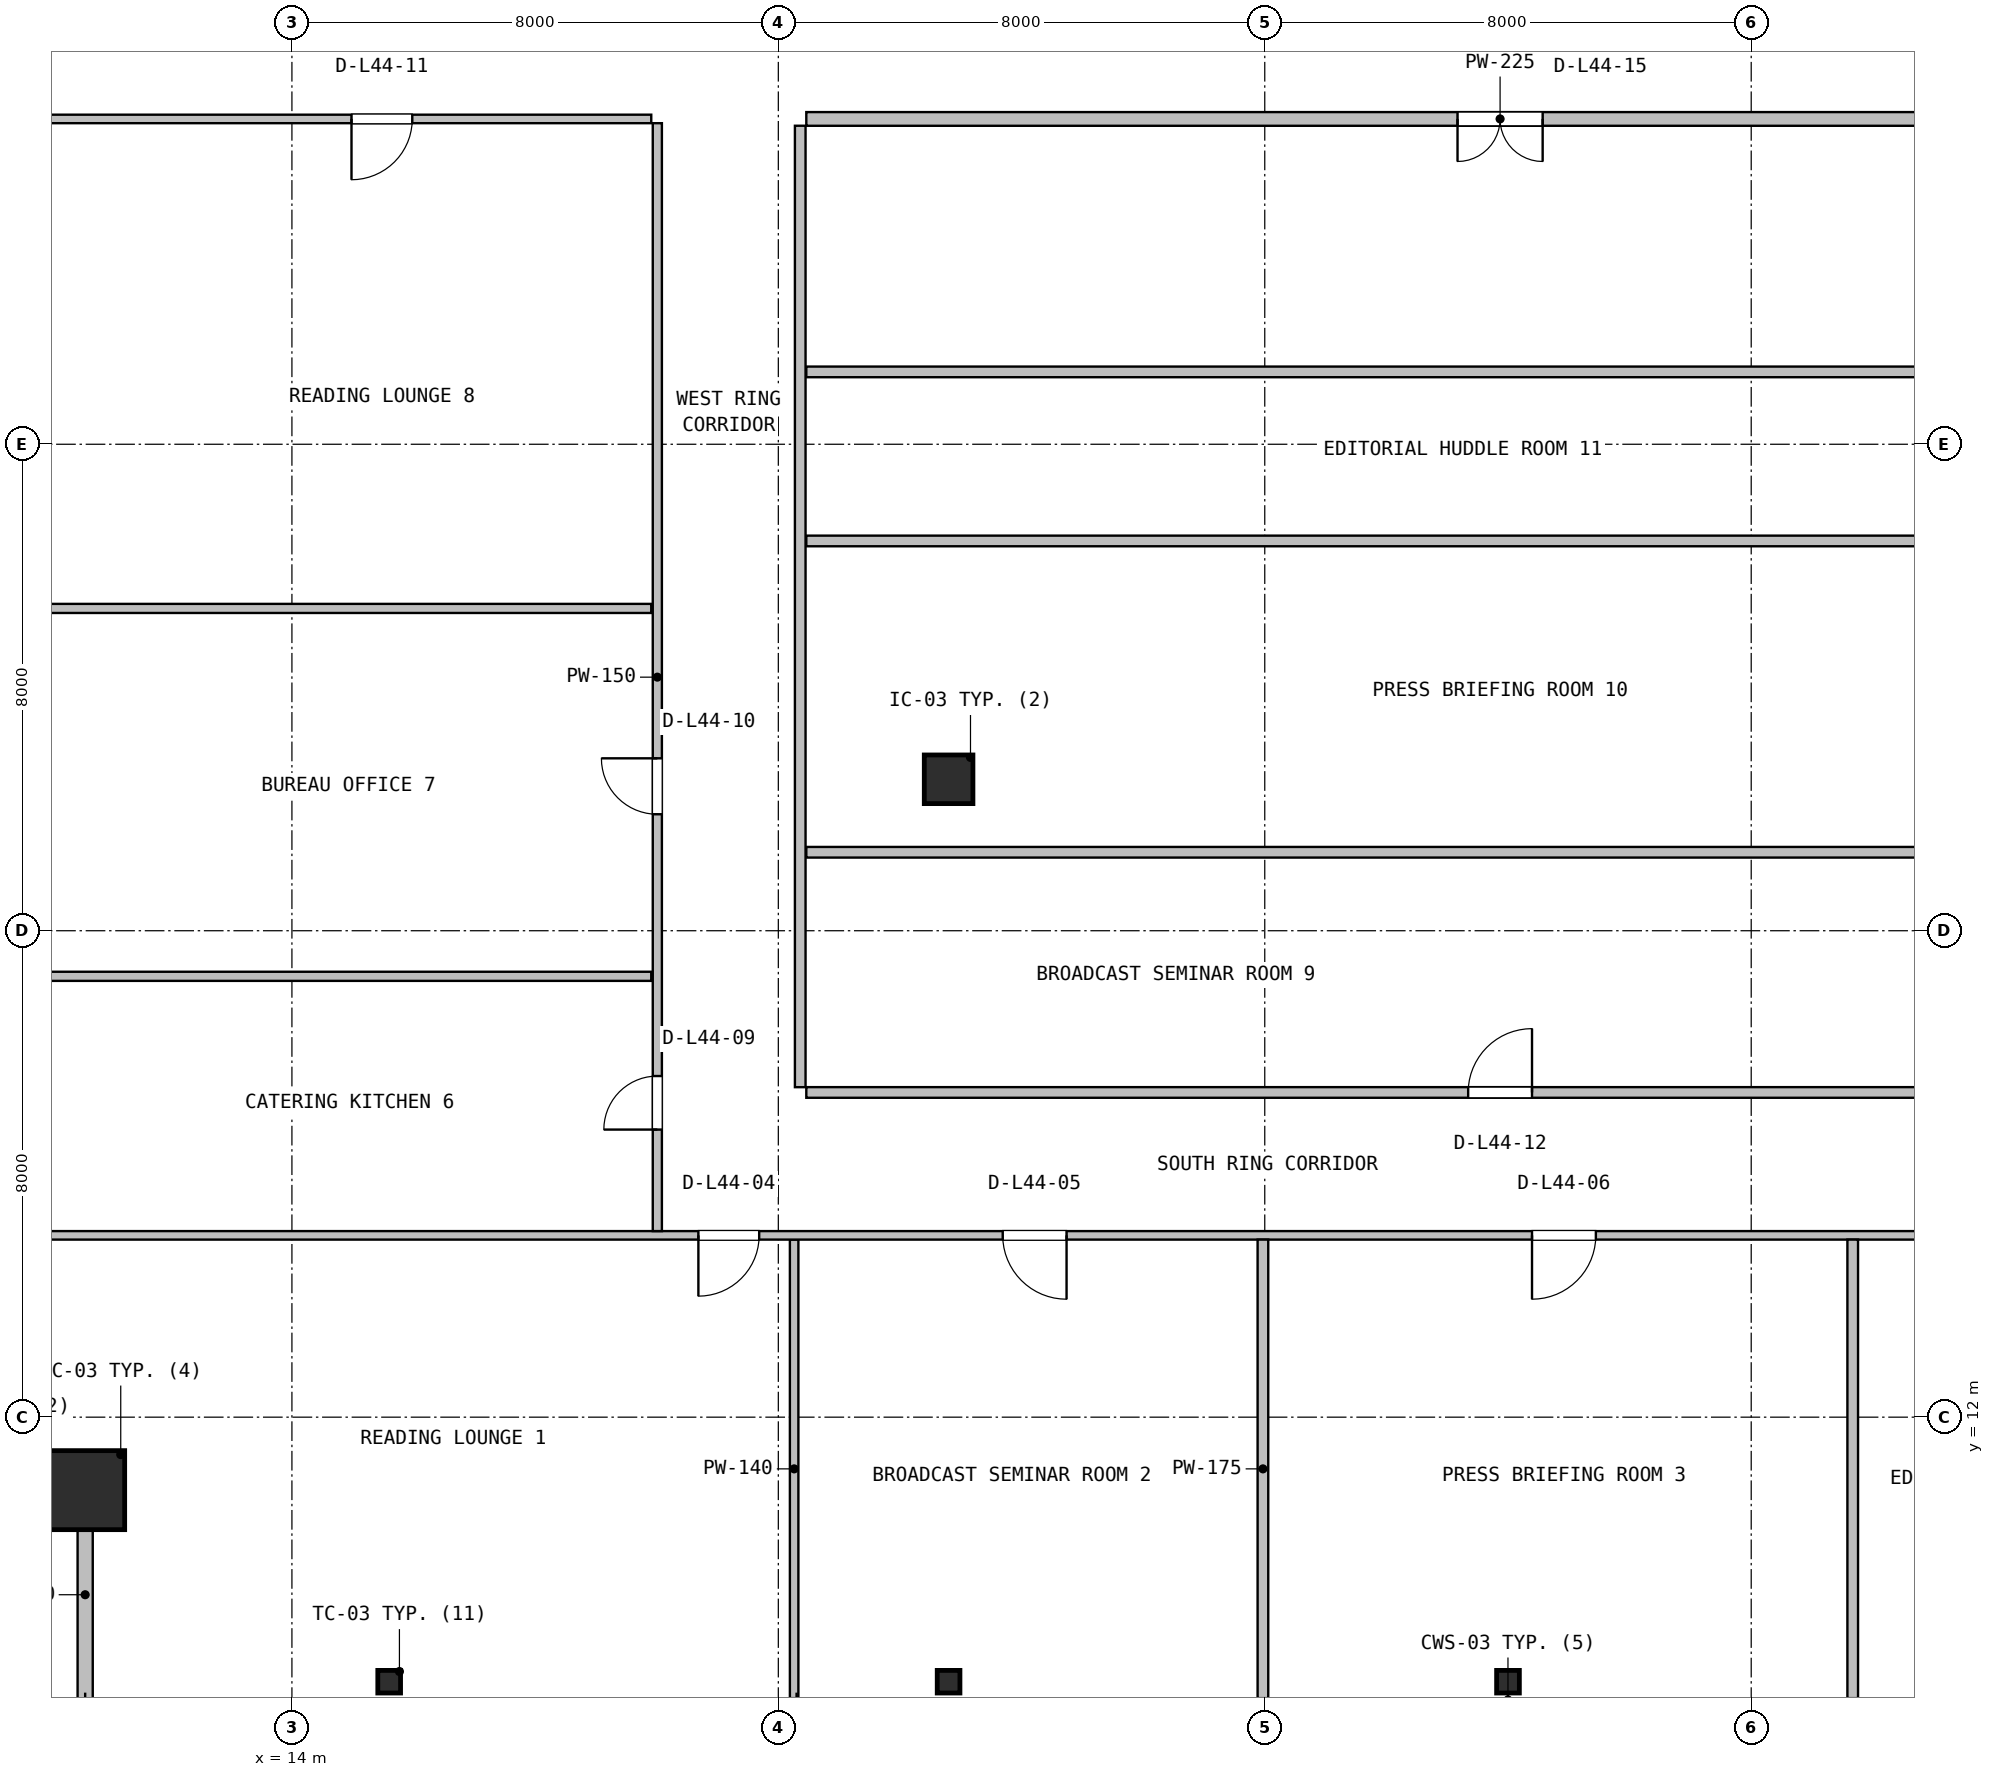
"""IFC4 building model, lengths in metres.
Left out: names, types, materials, properties, quantities, classifications, styles, units other than length and angle.
Written with IfcOpenShell. Run it as: python <this file> out.ifc"""

import sys

from ifc_helpers import new_model, si_unit, direction, frame, frame_2d, origin, origin_2d, place, context, subcontext, project, spatial, rectangle, hollow_rectangle, i_section, extrude, source, transform, mapped, element, fill, save


model = new_model("IFC4")
c1 = context("Model", 3, precision=1e-05, world=origin(), true_north=direction((0.0, 1.0)))
c2 = subcontext(c1, "Body", "Model", "MODEL_VIEW")
j1 = project(units=[si_unit("LENGTHUNIT", "METRE"), si_unit("PLANEANGLEUNIT", "RADIAN")], contexts=[c1])
p1 = place(None, origin())
s1 = spatial("IfcSite", under=j1, at=p1, CompositionType="ELEMENT")
p2 = place(p1, origin())
s2 = spatial("IfcBuilding", under=s1, at=p2, CompositionType="ELEMENT")
p3 = place(p2, frame((0.0, 0.0, 180.0)))
s3 = spatial("IfcBuildingStorey", under=s2, at=p3, CompositionType="ELEMENT", Elevation=180.0)
m1 = source(origin(), c2, "Body", "SweptSolid", [
    extrude(hollow_rectangle(XDim=1.3, YDim=1.3, WallThickness=0.05, at=origin_2d()), origin(), (0.0, 0.0, 1.0), 3.8),
])
p4 = place(p3, frame((10.6, 10.8, 0.0), z_axis=(0.0, 0.0, 1.0), x_axis=(1.0, 0.0, 0.0)))
e1 = element("IfcColumn", 1, at=p4, inside=s3, PredefinedType="COLUMN", context=c2, shape_type="MappedRepresentation", body=[
    mapped(m1, transform((0.0, 0.0, 0.0), x_axis=(1.0, 0.0, 0.0), y_axis=(0.0, 1.0, 0.0), z_axis=(0.0, 0.0, 1.0), scale=1.0)),
])
m2 = source(origin(), c2, "Body", "SweptSolid", [
    extrude(i_section(OverallWidth=0.374, OverallDepth=0.372, WebThickness=0.016, FlangeThickness=0.026, FilletRadius=0.016, at=origin_2d()), origin(), (0.0, 0.0, 1.0), 3.8),
])
for number, where, z_axis, x_axis in (
    (2, (15.6, 7.65, 0.0), (0.0, 0.0, 1.0), (1.0, 0.0, 0.0)),
    (3, (24.8, 7.65, 0.0), (0.0, 0.0, 1.0), (1.0, 0.0, 0.0)),
    (4, (34.0, 7.65, 0.0), (0.0, 0.0, 1.0), (1.0, 0.0, 0.0)),
):
    element("IfcColumn", number, at=place(p3, frame(where, z_axis=z_axis, x_axis=x_axis)), inside=s3, PredefinedType="COLUMN", context=c2, shape_type="MappedRepresentation", body=[
        mapped(m2, transform((0.0, 0.0, 0.0), x_axis=(1.0, 0.0, 0.0), y_axis=(0.0, 1.0, 0.0), z_axis=(0.0, 0.0, 1.0), scale=1.0)),
    ])
m3 = source(origin(), c2, "Body", "SweptSolid", [
    extrude(rectangle(XDim=0.8, YDim=0.8, at=origin_2d()), origin(), (0.0, 0.0, 1.0), 3.8),
])
p5 = place(p3, frame((24.8, 22.49, 0.0), z_axis=(0.0, 0.0, 1.0), x_axis=(1.0, 0.0, 0.0)))
e5 = element("IfcColumn", 5, at=p5, inside=s3, PredefinedType="COLUMN", context=c2, shape_type="MappedRepresentation", body=[
    mapped(m3, transform((0.0, 0.0, 0.0), x_axis=(1.0, 0.0, 0.0), y_axis=(0.0, 1.0, 0.0), z_axis=(0.0, 0.0, 1.0), scale=1.0)),
])
p6 = place(p3, frame((10.6, 7.28, 0.0), z_axis=(0.0, 0.0, 1.0), x_axis=(0.0, 1.0, 0.0)))
e6 = element("IfcWall", 6, at=p6, inside=s3, PredefinedType="SOLIDWALL", context=c2, shape_type="SweptSolid", body=[
    extrude(rectangle(XDim=3.6, YDim=0.25, at=frame_2d((1.8, 0.0))), origin(), (0.0, 0.0, 1.0), 3.108),
])
p7 = place(p3, frame((22.26, 7.38, 0.0), z_axis=(0.0, 0.0, 1.0), x_axis=(0.0, 1.0, 0.0)))
e7 = element("IfcWall", 7, at=p7, inside=s3, PredefinedType="PARTITIONING", context=c2, shape_type="SweptSolid", body=[
    extrude(rectangle(XDim=7.54, YDim=0.14, at=frame_2d((3.77, 0.0))), origin(), (0.0, 0.0, 1.0), 3.108),
])
p8 = place(p3, frame((7.18, 14.99, 0.0), z_axis=(0.0, 0.0, 1.0), x_axis=(1.0, 0.0, 0.0)))
e8 = element("IfcWall", 8, at=p8, inside=s3, PredefinedType="PARTITIONING", context=c2, shape_type="SweptSolid", body=[
    extrude(rectangle(XDim=53.64, YDim=0.14, at=frame_2d((26.82, 0.0))), origin(), (0.0, 0.0, 1.0), 2.909),
])
p9 = place(p8, frame((13.505, 0.0, 0.0)))
e9 = element("IfcOpeningElement", 9, at=p9, cuts=e8, PredefinedType="OPENING", context=c2, shape_type="SweptSolid", body=[
    extrude(rectangle(XDim=1.0, YDim=2.1, at=frame_2d((0.5, 1.05))), frame((0.0, 0.08, 0.0), z_axis=(0.0, -1.0, 0.0), x_axis=(1.0, 0.0, 0.0)), (0.0, 0.0, 1.0), 0.16),
])
p10 = place(p8, frame((18.51, 0.0, 0.0)))
e10 = element("IfcOpeningElement", 10, at=p10, cuts=e8, PredefinedType="OPENING", context=c2, shape_type="SweptSolid", body=[
    extrude(rectangle(XDim=1.05, YDim=2.1, at=frame_2d((0.525, 1.05))), frame((0.0, 0.08, 0.0), z_axis=(0.0, -1.0, 0.0), x_axis=(1.0, 0.0, 0.0)), (0.0, 0.0, 1.0), 0.16),
])
p11 = place(p8, frame((27.215, 0.0, 0.0)))
e11 = element("IfcOpeningElement", 11, at=p11, cuts=e8, PredefinedType="OPENING", context=c2, shape_type="SweptSolid", body=[
    extrude(rectangle(XDim=1.05, YDim=2.1, at=frame_2d((0.525, 1.05))), frame((0.0, 0.08, 0.0), z_axis=(0.0, -1.0, 0.0), x_axis=(1.0, 0.0, 0.0)), (0.0, 0.0, 1.0), 0.16),
])
p12 = place(p8, frame((34.87, 0.0, 0.0)))
e12 = element("IfcOpeningElement", 12, at=p12, cuts=e8, PredefinedType="OPENING", context=c2, shape_type="SweptSolid", body=[
    extrude(rectangle(XDim=1.05, YDim=2.1, at=frame_2d((0.525, 1.05))), frame((0.0, 0.08, 0.0), z_axis=(0.0, -1.0, 0.0), x_axis=(1.0, 0.0, 0.0)), (0.0, 0.0, 1.0), 0.16),
])
p13 = place(p8, frame((38.675, 0.0, 0.0)))
e13 = element("IfcOpeningElement", 13, at=p13, cuts=e8, PredefinedType="OPENING", context=c2, shape_type="SweptSolid", body=[
    extrude(rectangle(XDim=1.4, YDim=2.12, at=frame_2d((0.7, 1.06))), frame((0.0, 0.08, 0.0), z_axis=(0.0, -1.0, 0.0), x_axis=(1.0, 0.0, 0.0)), (0.0, 0.0, 1.0), 0.16),
])
for number, where, z_axis, x_axis in (
    (14, (29.97, 7.38, 0.0), (0.0, 0.0, 1.0), (0.0, 1.0, 0.0)),
    (15, (39.67, 7.38, 0.0), (0.0, 0.0, 1.0), (0.0, 1.0, 0.0)),
):
    element("IfcWall", number, at=place(p3, frame(where, z_axis=z_axis, x_axis=x_axis)), inside=s3, PredefinedType="PARTITIONING", context=c2, shape_type="SweptSolid", body=[
        extrude(rectangle(XDim=7.54, YDim=0.175, at=frame_2d((3.77, 0.0))), origin(), (0.0, 0.0, 1.0), 3.108),
    ])
p14 = place(p3, frame((20.01, 15.06, 0.0), z_axis=(0.0, 0.0, 1.0), x_axis=(0.0, 1.0, 0.0)))
e16 = element("IfcWall", 16, at=p14, inside=s3, PredefinedType="PARTITIONING", context=c2, shape_type="SweptSolid", body=[
    extrude(rectangle(XDim=18.22, YDim=0.15, at=frame_2d((9.11, 0.0))), origin(), (0.0, 0.0, 1.0), 3.222),
])
p15 = place(p14, frame((1.67, 0.0, 0.0)))
e17 = element("IfcOpeningElement", 17, at=p15, cuts=e16, PredefinedType="OPENING", context=c2, shape_type="SweptSolid", body=[
    extrude(rectangle(XDim=0.88, YDim=2.06, at=frame_2d((0.44, 1.03))), frame((0.0, 0.085, 0.0), z_axis=(0.0, -1.0, 0.0), x_axis=(1.0, 0.0, 0.0)), (0.0, 0.0, 1.0), 0.17),
])
p16 = place(p14, frame((6.855, 0.0, 0.0)))
e18 = element("IfcOpeningElement", 18, at=p16, cuts=e16, PredefinedType="OPENING", context=c2, shape_type="SweptSolid", body=[
    extrude(rectangle(XDim=0.92, YDim=2.08, at=frame_2d((0.46, 1.04))), frame((0.0, 0.085, 0.0), z_axis=(0.0, -1.0, 0.0), x_axis=(1.0, 0.0, 0.0)), (0.0, 0.0, 1.0), 0.17),
])
for number, where, z_axis, x_axis in (
    (19, (7.18, 19.25, 0.0), (0.0, 0.0, 1.0), (1.0, 0.0, 0.0)),
    (20, (7.18, 25.3, 0.0), (0.0, 0.0, 1.0), (1.0, 0.0, 0.0)),
):
    element("IfcWall", number, at=place(p3, frame(where, z_axis=z_axis, x_axis=x_axis)), inside=s3, PredefinedType="PARTITIONING", context=c2, shape_type="SweptSolid", body=[
        extrude(rectangle(XDim=12.73, YDim=0.15, at=frame_2d((6.365, 0.0))), origin(), (0.0, 0.0, 1.0), 3.108),
    ])
p17 = place(p3, frame((7.18, 33.35, 0.0), z_axis=(0.0, 0.0, 1.0), x_axis=(1.0, 0.0, 0.0)))
e21 = element("IfcWall", 21, at=p17, inside=s3, PredefinedType="PARTITIONING", context=c2, shape_type="SweptSolid", body=[
    extrude(rectangle(XDim=12.73, YDim=0.14, at=frame_2d((6.365, 0.0))), origin(), (0.0, 0.0, 1.0), 3.108),
])
p18 = place(p17, frame((7.8, 0.0, 0.0)))
e22 = element("IfcOpeningElement", 22, at=p18, cuts=e21, PredefinedType="OPENING", context=c2, shape_type="SweptSolid", body=[
    extrude(rectangle(XDim=1.0, YDim=2.1, at=frame_2d((0.5, 1.05))), frame((0.0, 0.08, 0.0), z_axis=(0.0, -1.0, 0.0), x_axis=(1.0, 0.0, 0.0)), (0.0, 0.0, 1.0), 0.16),
])
p19 = place(p3, frame((22.46, 17.34, 0.0), z_axis=(0.0, 0.0, 1.0), x_axis=(1.0, 0.0, 0.0)))
e23 = element("IfcWall", 23, at=p19, inside=s3, PredefinedType="PARTITIONING", context=c2, shape_type="SweptSolid", body=[
    extrude(rectangle(XDim=22.82, YDim=0.175, at=frame_2d((11.41, 0.0))), origin(), (0.0, 0.0, 1.0), 2.909),
])
p20 = place(p19, frame((10.885, 0.0, 0.0)))
e24 = element("IfcOpeningElement", 24, at=p20, cuts=e23, PredefinedType="OPENING", context=c2, shape_type="SweptSolid", body=[
    extrude(rectangle(XDim=1.05, YDim=2.1, at=frame_2d((0.525, 1.05))), frame((0.0, 0.098, 0.0), z_axis=(0.0, -1.0, 0.0), x_axis=(1.0, 0.0, 0.0)), (0.0, 0.0, 1.0), 0.195),
])
p21 = place(p3, frame((22.46, 21.29, 0.0), z_axis=(0.0, 0.0, 1.0), x_axis=(1.0, 0.0, 0.0)))
e25 = element("IfcWall", 25, at=p21, inside=s3, PredefinedType="PARTITIONING", context=c2, shape_type="SweptSolid", body=[
    extrude(rectangle(XDim=22.82, YDim=0.175, at=frame_2d((11.41, 0.0))), origin(), (0.0, 0.0, 1.0), 2.909),
])
p22 = place(p3, frame((22.36, 17.427, 0.0), z_axis=(0.0, 0.0, 1.0), x_axis=(0.0, 1.0, 0.0)))
e26 = element("IfcWall", 26, at=p22, inside=s3, PredefinedType="PARTITIONING", context=c2, shape_type="SweptSolid", body=[
    extrude(rectangle(XDim=15.811, YDim=0.175, at=frame_2d((7.906, 0.0))), origin(), (0.0, 0.0, 1.0), 3.222),
])
for number, where, z_axis, x_axis in (
    (27, (22.46, 26.41, 0.0), (0.0, 0.0, 1.0), (1.0, 0.0, 0.0)),
    (28, (22.46, 29.19, 0.0), (0.0, 0.0, 1.0), (1.0, 0.0, 0.0)),
):
    element("IfcWall", number, at=place(p3, frame(where, z_axis=z_axis, x_axis=x_axis)), inside=s3, PredefinedType="PARTITIONING", context=c2, shape_type="SweptSolid", body=[
        extrude(rectangle(XDim=22.82, YDim=0.175, at=frame_2d((11.41, 0.0))), origin(), (0.0, 0.0, 1.0), 2.909),
    ])
p23 = place(p3, frame((22.46, 33.35, 0.0), z_axis=(0.0, 0.0, 1.0), x_axis=(1.0, 0.0, 0.0)))
e29 = element("IfcWall", 29, at=p23, inside=s3, PredefinedType="PARTITIONING", context=c2, shape_type="SweptSolid", body=[
    extrude(rectangle(XDim=22.82, YDim=0.225, at=frame_2d((11.41, 0.0))), origin(), (0.0, 0.0, 1.0), 2.909),
])
p24 = place(p23, frame((10.71, 0.0, 0.0)))
e30 = element("IfcOpeningElement", 30, at=p24, cuts=e29, PredefinedType="OPENING", context=c2, shape_type="SweptSolid", body=[
    extrude(rectangle(XDim=1.4, YDim=2.12, at=frame_2d((0.7, 1.06))), frame((0.0, 0.123, 0.0), z_axis=(0.0, -1.0, 0.0), x_axis=(1.0, 0.0, 0.0)), (0.0, 0.0, 1.0), 0.245),
])
m4 = source(origin(), c2, "Body", "SweptSolid", [
    extrude(rectangle(XDim=1.0, YDim=2.1, at=frame_2d((0.5, 1.05))), frame((0.0, 0.025, 0.0), z_axis=(0.0, -1.0, 0.0), x_axis=(1.0, 0.0, 0.0)), (0.0, 0.0, 1.0), 0.05),
])
p25 = place(p9, frame((1.0, 0.0, 0.0), z_axis=(0.0, 0.0, 1.0), x_axis=(-1.0, 0.0, 0.0)))
e31 = element("IfcDoor", 31, at=p25, inside=s3, OperationType="SINGLE_SWING_LEFT", PredefinedType="DOOR", context=c2, shape_type="MappedRepresentation", body=[
    mapped(m4, transform((0.0, 0.0, 0.0), x_axis=(1.0, 0.0, 0.0), y_axis=(0.0, 1.0, 0.0), z_axis=(0.0, 0.0, 1.0), scale=1.0)),
])
fill(e9, e31)
m5 = source(origin(), c2, "Body", "SweptSolid", [
    extrude(rectangle(XDim=1.05, YDim=2.1, at=frame_2d((0.525, 1.05))), frame((0.0, 0.025, 0.0), z_axis=(0.0, -1.0, 0.0), x_axis=(1.0, 0.0, 0.0)), (0.0, 0.0, 1.0), 0.05),
])
p26 = place(p10, frame((1.05, 0.0, 0.0), z_axis=(0.0, 0.0, 1.0), x_axis=(-1.0, 0.0, 0.0)))
e32 = element("IfcDoor", 32, at=p26, inside=s3, OperationType="SINGLE_SWING_RIGHT", PredefinedType="DOOR", context=c2, shape_type="MappedRepresentation", body=[
    mapped(m5, transform((0.0, 0.0, 0.0), x_axis=(1.0, 0.0, 0.0), y_axis=(0.0, 1.0, 0.0), z_axis=(0.0, 0.0, 1.0), scale=1.0)),
])
fill(e10, e32)
p27 = place(p11, frame((1.05, 0.0, 0.0), z_axis=(0.0, 0.0, 1.0), x_axis=(-1.0, 0.0, 0.0)))
e33 = element("IfcDoor", 33, at=p27, inside=s3, OperationType="SINGLE_SWING_LEFT", PredefinedType="DOOR", context=c2, shape_type="MappedRepresentation", body=[
    mapped(m5, transform((0.0, 0.0, 0.0), x_axis=(1.0, 0.0, 0.0), y_axis=(0.0, 1.0, 0.0), z_axis=(0.0, 0.0, 1.0), scale=1.0)),
])
fill(e11, e33)
m6 = source(origin(), c2, "Body", "SweptSolid", [
    extrude(rectangle(XDim=0.88, YDim=2.06, at=frame_2d((0.44, 1.03))), frame((0.0, 0.025, 0.0), z_axis=(0.0, -1.0, 0.0), x_axis=(1.0, 0.0, 0.0)), (0.0, 0.0, 1.0), 0.05),
])
p28 = place(p15, origin())
e34 = element("IfcDoor", 34, at=p28, inside=s3, OperationType="SINGLE_SWING_LEFT", PredefinedType="DOOR", context=c2, shape_type="MappedRepresentation", body=[
    mapped(m6, transform((0.0, 0.0, 0.0), x_axis=(1.0, 0.0, 0.0), y_axis=(0.0, 1.0, 0.0), z_axis=(0.0, 0.0, 1.0), scale=1.0)),
])
fill(e17, e34)
m7 = source(origin(), c2, "Body", "SweptSolid", [
    extrude(rectangle(XDim=0.92, YDim=2.08, at=frame_2d((0.46, 1.04))), frame((0.0, 0.025, 0.0), z_axis=(0.0, -1.0, 0.0), x_axis=(1.0, 0.0, 0.0)), (0.0, 0.0, 1.0), 0.05),
])
p29 = place(p16, origin())
e35 = element("IfcDoor", 35, at=p29, inside=s3, OperationType="SINGLE_SWING_RIGHT", PredefinedType="DOOR", context=c2, shape_type="MappedRepresentation", body=[
    mapped(m7, transform((0.0, 0.0, 0.0), x_axis=(1.0, 0.0, 0.0), y_axis=(0.0, 1.0, 0.0), z_axis=(0.0, 0.0, 1.0), scale=1.0)),
])
fill(e18, e35)
p30 = place(p18, frame((1.0, 0.0, 0.0), z_axis=(0.0, 0.0, 1.0), x_axis=(-1.0, 0.0, 0.0)))
e36 = element("IfcDoor", 36, at=p30, inside=s3, OperationType="SINGLE_SWING_LEFT", PredefinedType="DOOR", context=c2, shape_type="MappedRepresentation", body=[
    mapped(m4, transform((0.0, 0.0, 0.0), x_axis=(1.0, 0.0, 0.0), y_axis=(0.0, 1.0, 0.0), z_axis=(0.0, 0.0, 1.0), scale=1.0)),
])
fill(e22, e36)
p31 = place(p20, origin())
e37 = element("IfcDoor", 37, at=p31, inside=s3, OperationType="SINGLE_SWING_RIGHT", PredefinedType="DOOR", context=c2, shape_type="MappedRepresentation", body=[
    mapped(m5, transform((0.0, 0.0, 0.0), x_axis=(1.0, 0.0, 0.0), y_axis=(0.0, 1.0, 0.0), z_axis=(0.0, 0.0, 1.0), scale=1.0)),
])
fill(e24, e37)
m8 = source(origin(), c2, "Body", "SweptSolid", [
    extrude(rectangle(XDim=1.4, YDim=2.12, at=frame_2d((0.7, 1.06))), frame((0.0, 0.025, 0.0), z_axis=(0.0, -1.0, 0.0), x_axis=(1.0, 0.0, 0.0)), (0.0, 0.0, 1.0), 0.05),
])
p32 = place(p24, frame((1.4, 0.0, 0.0), z_axis=(0.0, 0.0, 1.0), x_axis=(-1.0, 0.0, 0.0)))
e38 = element("IfcDoor", 38, at=p32, inside=s3, OperationType="DOUBLE_DOOR_SINGLE_SWING", PredefinedType="DOOR", context=c2, shape_type="MappedRepresentation", body=[
    mapped(m8, transform((0.0, 0.0, 0.0), x_axis=(1.0, 0.0, 0.0), y_axis=(0.0, 1.0, 0.0), z_axis=(0.0, 0.0, 1.0), scale=1.0)),
])
fill(e30, e38)
save(model, sys.argv[1])
